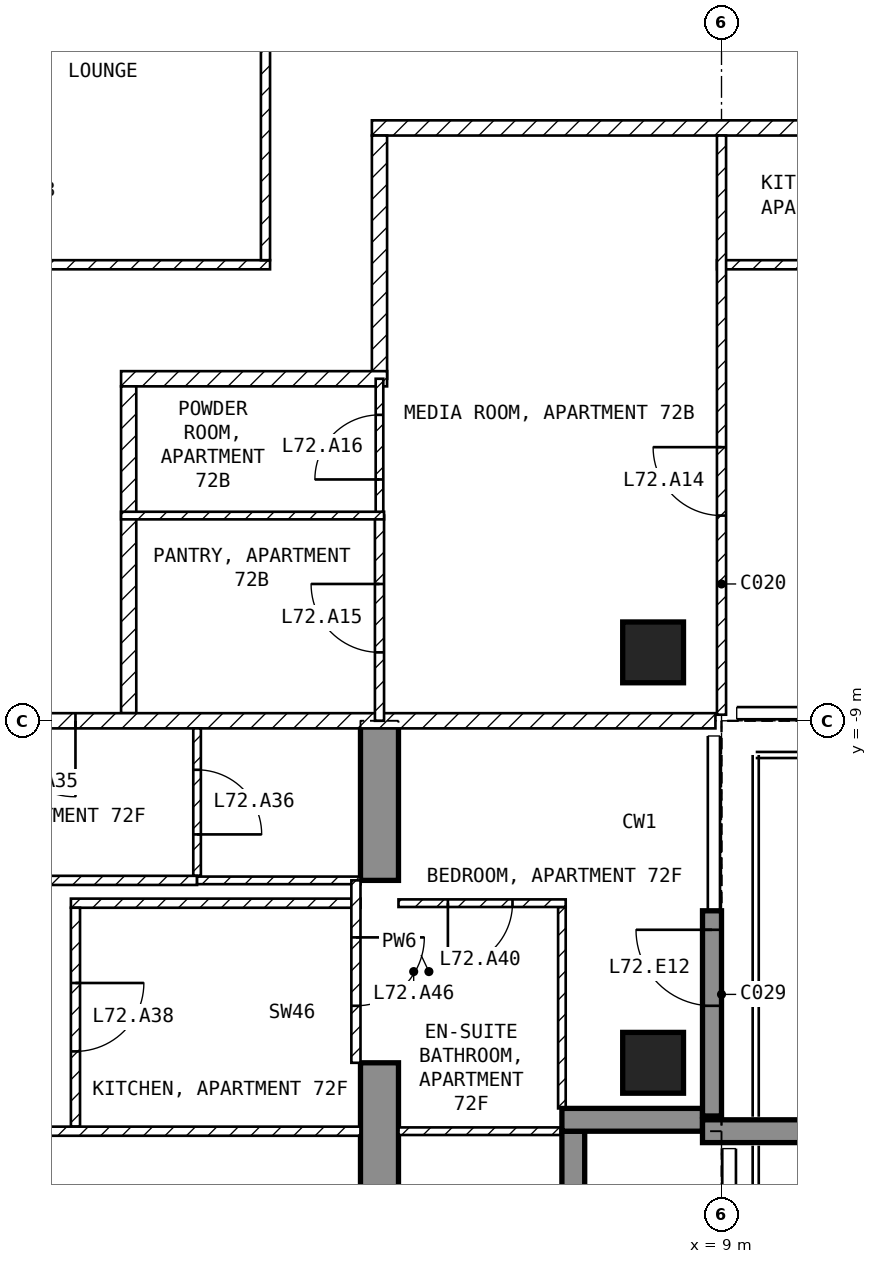
"""IFC4 building model, lengths in metres.
Left out: names, types, materials, properties, quantities, classifications, styles, units other than length and angle.
Written with IfcOpenShell. Run it as: python <this file> out.ifc"""

import sys

from ifc_helpers import new_model, si_unit, direction, frame, frame_2d, origin, origin_2d, place, context, subcontext, project, spatial, polyline, rectangle, outline, extrude, element, fill, save


model = new_model("IFC4")
c1 = context("Model", 3, precision=1e-05, world=origin(), true_north=direction((0.0, 1.0)))
c2 = subcontext(c1, "Body", "Model", "MODEL_VIEW")
j1 = project(units=[si_unit("LENGTHUNIT", "METRE"), si_unit("PLANEANGLEUNIT", "RADIAN")], contexts=[c1])
p1 = place(None, origin())
s1 = spatial("IfcSite", under=j1, at=p1, CompositionType="ELEMENT")
p2 = place(p1, origin())
s2 = spatial("IfcBuilding", under=s1, at=p2, CompositionType="ELEMENT")
p3 = place(p2, frame((0.0, 0.0, 281.5)))
s3 = spatial("IfcBuildingStorey", under=s2, at=p3, CompositionType="ELEMENT", Elevation=281.5)
for number, where, z_axis, x_axis in (
    (1, (8.1, -13.5, -0.25), (0.0, 0.0, 1.0), (1.0, 0.0, 0.0)),
    (2, (8.1, -8.1, -0.25), (0.0, 0.0, 1.0), (1.0, 0.0, 0.0)),
):
    element("IfcColumn", number, at=place(p3, frame(where, z_axis=z_axis, x_axis=x_axis)), inside=s3, PredefinedType="COLUMN", context=c2, shape_type="SweptSolid", body=[
        extrude(rectangle(XDim=0.8, YDim=0.8, at=origin_2d()), origin(), (0.0, 0.0, 1.0), 3.45),
    ])
p4 = place(p3, frame((4.25, -16.7, -0.25), z_axis=(1.0, 0.0, 0.0), x_axis=(0.0, 1.0, 0.0)))
e3 = element("IfcWall", 3, at=p4, inside=s3, PredefinedType="SHEAR", context=c2, shape_type="SweptSolid", body=[
    extrude(outline(polyline([(0.0, 0.0), (3.2, 0.0), (3.2, 2.65), (5.6, 2.65), (5.6, 0.0), (7.7, 0.0), (7.7, 3.45), (0.0, 3.45), (0.0, 0.0)])), origin(), (0.0, 0.0, 1.0), 0.5),
])
p5 = place(p3, frame((8.875, -14.2, 0.0), z_axis=(0.0, 0.0, 1.0), x_axis=(0.0, 1.0, 0.0)))
e4 = element("IfcWall", 4, at=p5, inside=s3, PredefinedType="SOLIDWALL", context=c2, shape_type="SweptSolid", body=[
    extrude(rectangle(XDim=2.7, YDim=0.25, at=frame_2d((1.35, 0.0))), origin(), (0.0, 0.0, 1.0), 3.2),
])
p6 = place(p5, frame((1.45, 0.0, 0.0)))
e5 = element("IfcOpeningElement", 5, at=p6, cuts=e4, PredefinedType="OPENING", context=c2, shape_type="SweptSolid", body=[
    extrude(rectangle(XDim=1.0, YDim=2.4, at=frame_2d((0.5, 1.2))), frame((0.0, 0.135, 0.0), z_axis=(0.0, -1.0, 0.0), x_axis=(1.0, 0.0, 0.0)), (0.0, 0.0, 1.0), 0.27),
])
p7 = place(p3, frame((7.05, -16.2, 0.0), z_axis=(0.0, 0.0, 1.0), x_axis=(0.0, 1.0, 0.0)))
e6 = element("IfcWall", 6, at=p7, inside=s3, PredefinedType="SOLIDWALL", context=c2, shape_type="SweptSolid", body=[
    extrude(rectangle(XDim=1.8, YDim=0.3, at=frame_2d((0.9, 0.0))), origin(), (0.0, 0.0, 1.0), 3.2),
])
p8 = place(p3, frame((6.9, -14.25, 0.0), z_axis=(0.0, 0.0, 1.0), x_axis=(1.0, 0.0, 0.0)))
e7 = element("IfcWall", 7, at=p8, inside=s3, PredefinedType="SOLIDWALL", context=c2, shape_type="SweptSolid", body=[
    extrude(rectangle(XDim=1.85, YDim=0.3, at=frame_2d((0.925, 0.0))), origin(), (0.0, 0.0, 1.0), 3.2),
])
p9 = place(p3, frame((8.75, -14.4, 0.0), z_axis=(0.0, 0.0, 1.0), x_axis=(1.0, 0.0, 0.0)))
e8 = element("IfcWall", 8, at=p9, inside=s3, PredefinedType="SOLIDWALL", context=c2, shape_type="SweptSolid", body=[
    extrude(rectangle(XDim=2.95, YDim=0.3, at=frame_2d((1.475, 0.0))), origin(), (0.0, 0.0, 1.0), 3.2),
])
p10 = place(p3, frame((-3.06, -3.0, 0.0), z_axis=(0.0, 0.0, 1.0), x_axis=(1.0, 0.0, 0.0)))
e9 = element("IfcWall", 9, at=p10, inside=s3, PredefinedType="PARTITIONING", context=c2, shape_type="SweptSolid", body=[
    extrude(rectangle(XDim=6.12, YDim=0.12, at=frame_2d((3.06, 0.0))), origin(), (0.0, 0.0, 1.0), 3.2),
])
p11 = place(p3, frame((3.0, -2.94, 0.0), z_axis=(0.0, 0.0, 1.0), x_axis=(0.0, 1.0, 0.0)))
e10 = element("IfcWall", 10, at=p11, inside=s3, PredefinedType="PARTITIONING", context=c2, shape_type="SweptSolid", body=[
    extrude(rectangle(XDim=5.88, YDim=0.12, at=frame_2d((2.94, 0.0))), origin(), (0.0, 0.0, 1.0), 3.2),
])
p12 = place(p3, frame((21.6, -1.2, 0.0), z_axis=(0.0, 0.0, 1.0), x_axis=(-1.0, 0.0, 0.0)))
e11 = element("IfcWall", 11, at=p12, inside=s3, PredefinedType="PARTITIONING", context=c2, shape_type="SweptSolid", body=[
    extrude(rectangle(XDim=17.2, YDim=0.2, at=frame_2d((8.6, 0.0))), origin(), (0.0, 0.0, 1.0), 3.2),
])
p13 = place(p12, frame((7.9, 0.0, 0.0)))
e12 = element("IfcOpeningElement", 12, at=p13, cuts=e11, PredefinedType="OPENING", context=c2, shape_type="SweptSolid", body=[
    extrude(rectangle(XDim=1.0, YDim=2.1, at=frame_2d((0.5, 1.05))), frame((0.0, 0.11, 0.0), z_axis=(0.0, -1.0, 0.0), x_axis=(1.0, 0.0, 0.0)), (0.0, 0.0, 1.0), 0.22),
])
p14 = place(p3, frame((4.5, -1.3, 0.0), z_axis=(0.0, 0.0, 1.0), x_axis=(0.0, -1.0, 0.0)))
e13 = element("IfcWall", 13, at=p14, inside=s3, PredefinedType="PARTITIONING", context=c2, shape_type="SweptSolid", body=[
    extrude(rectangle(XDim=3.2, YDim=0.2, at=frame_2d((1.6, 0.0))), origin(), (0.0, 0.0, 1.0), 3.2),
])
p15 = place(p3, frame((4.6, -4.5, 0.0), z_axis=(0.0, 0.0, 1.0), x_axis=(-1.0, 0.0, 0.0)))
e14 = element("IfcWall", 14, at=p15, inside=s3, PredefinedType="PARTITIONING", context=c2, shape_type="SweptSolid", body=[
    extrude(rectangle(XDim=3.5, YDim=0.2, at=frame_2d((1.75, 0.0))), origin(), (0.0, 0.0, 1.0), 3.2),
])
p16 = place(p3, frame((1.2, -4.6, 0.0), z_axis=(0.0, 0.0, 1.0), x_axis=(0.0, -1.0, 0.0)))
e15 = element("IfcWall", 15, at=p16, inside=s3, PredefinedType="PARTITIONING", context=c2, shape_type="SweptSolid", body=[
    extrude(rectangle(XDim=4.3, YDim=0.2, at=frame_2d((2.15, 0.0))), origin(), (0.0, 0.0, 1.0), 3.2),
])
p17 = place(p3, frame((8.92, -9.0, 0.0), z_axis=(0.0, 0.0, 1.0), x_axis=(-1.0, 0.0, 0.0)))
e16 = element("IfcWall", 16, at=p17, inside=s3, PredefinedType="PARTITIONING", context=c2, shape_type="SweptSolid", body=[
    extrude(rectangle(XDim=17.84, YDim=0.2, at=frame_2d((8.92, 0.0))), origin(), (0.0, 0.0, 1.0), 3.2),
])
p18 = place(p17, frame((8.42, 0.0, 0.0)))
e17 = element("IfcOpeningElement", 17, at=p18, cuts=e16, PredefinedType="OPENING", context=c2, shape_type="SweptSolid", body=[
    extrude(rectangle(XDim=1.0, YDim=2.1, at=frame_2d((0.5, 1.05))), frame((0.0, 0.11, 0.0), z_axis=(0.0, -1.0, 0.0), x_axis=(1.0, 0.0, 0.0)), (0.0, 0.0, 1.0), 0.22),
])
p19 = place(p3, frame((16.8, -3.0, 0.0), z_axis=(0.0, 0.0, 1.0), x_axis=(-1.0, 0.0, 0.0)))
e18 = element("IfcWall", 18, at=p19, inside=s3, PredefinedType="PARTITIONING", context=c2, shape_type="SweptSolid", body=[
    extrude(rectangle(XDim=7.86, YDim=0.12, at=frame_2d((3.93, 0.0))), origin(), (0.0, 0.0, 1.0), 3.2),
])
p20 = place(p19, frame((3.15, 0.0, 0.0)))
e19 = element("IfcOpeningElement", 19, at=p20, cuts=e18, PredefinedType="OPENING", context=c2, shape_type="SweptSolid", body=[
    extrude(rectangle(XDim=0.9, YDim=2.1, at=frame_2d((0.45, 1.05))), frame((0.0, 0.07, 0.0), z_axis=(0.0, -1.0, 0.0), x_axis=(1.0, 0.0, 0.0)), (0.0, 0.0, 1.0), 0.14),
])
p21 = place(p3, frame((9.0, -8.92, 0.0), z_axis=(0.0, 0.0, 1.0), x_axis=(0.0, 1.0, 0.0)))
e20 = element("IfcWall", 20, at=p21, inside=s3, PredefinedType="PARTITIONING", context=c2, shape_type="SweptSolid", body=[
    extrude(rectangle(XDim=7.62, YDim=0.12, at=frame_2d((3.81, 0.0))), origin(), (0.0, 0.0, 1.0), 3.2),
])
p22 = place(p21, frame((2.62, 0.0, 0.0)))
e21 = element("IfcOpeningElement", 21, at=p22, cuts=e20, PredefinedType="OPENING", context=c2, shape_type="SweptSolid", body=[
    extrude(rectangle(XDim=0.9, YDim=2.1, at=frame_2d((0.45, 1.05))), frame((0.0, 0.07, 0.0), z_axis=(0.0, -1.0, 0.0), x_axis=(1.0, 0.0, 0.0)), (0.0, 0.0, 1.0), 0.14),
])
p23 = place(p3, frame((4.5, -6.3, 0.0), z_axis=(0.0, 0.0, 1.0), x_axis=(0.0, 1.0, 0.0)))
e22 = element("IfcWall", 22, at=p23, inside=s3, PredefinedType="PARTITIONING", context=c2, shape_type="SweptSolid", body=[
    extrude(rectangle(XDim=1.8, YDim=0.1, at=frame_2d((0.9, 0.0))), origin(), (0.0, 0.0, 1.0), 3.2),
])
p24 = place(p23, frame((0.475, 0.0, 0.0)))
e23 = element("IfcOpeningElement", 23, at=p24, cuts=e22, PredefinedType="OPENING", context=c2, shape_type="SweptSolid", body=[
    extrude(rectangle(XDim=0.85, YDim=2.1, at=frame_2d((0.425, 1.05))), frame((0.0, 0.06, 0.0), z_axis=(0.0, -1.0, 0.0), x_axis=(1.0, 0.0, 0.0)), (0.0, 0.0, 1.0), 0.12),
])
p25 = place(p3, frame((4.5, -9.0, 0.0), z_axis=(0.0, 0.0, 1.0), x_axis=(0.0, 1.0, 0.0)))
e24 = element("IfcWall", 24, at=p25, inside=s3, PredefinedType="PARTITIONING", context=c2, shape_type="SweptSolid", body=[
    extrude(rectangle(XDim=2.7, YDim=0.12, at=frame_2d((1.35, 0.0))), origin(), (0.0, 0.0, 1.0), 3.2),
])
p26 = place(p25, frame((0.9, 0.0, 0.0)))
e25 = element("IfcOpeningElement", 25, at=p26, cuts=e24, PredefinedType="OPENING", context=c2, shape_type="SweptSolid", body=[
    extrude(rectangle(XDim=0.9, YDim=2.1, at=frame_2d((0.45, 1.05))), frame((0.0, 0.07, 0.0), z_axis=(0.0, -1.0, 0.0), x_axis=(1.0, 0.0, 0.0)), (0.0, 0.0, 1.0), 0.14),
])
p27 = place(p3, frame((4.56, -6.3, 0.0), z_axis=(0.0, 0.0, 1.0), x_axis=(-1.0, 0.0, 0.0)))
e26 = element("IfcWall", 26, at=p27, inside=s3, PredefinedType="PARTITIONING", context=c2, shape_type="SweptSolid", body=[
    extrude(rectangle(XDim=3.46, YDim=0.1, at=frame_2d((1.73, 0.0))), origin(), (0.0, 0.0, 1.0), 3.2),
])
p28 = place(p3, frame((2.1, -9.1, 0.0), z_axis=(0.0, 0.0, 1.0), x_axis=(0.0, -1.0, 0.0)))
e27 = element("IfcWall", 27, at=p28, inside=s3, PredefinedType="PARTITIONING", context=c2, shape_type="SweptSolid", body=[
    extrude(rectangle(XDim=1.94, YDim=0.1, at=frame_2d((0.97, 0.0))), origin(), (0.0, 0.0, 1.0), 3.2),
])
p29 = place(p28, frame((0.545, 0.0, 0.0)))
e28 = element("IfcOpeningElement", 28, at=p29, cuts=e27, PredefinedType="OPENING", context=c2, shape_type="SweptSolid", body=[
    extrude(rectangle(XDim=0.85, YDim=2.1, at=frame_2d((0.425, 1.05))), frame((0.0, 0.06, 0.0), z_axis=(0.0, -1.0, 0.0), x_axis=(1.0, 0.0, 0.0)), (0.0, 0.0, 1.0), 0.12),
])
p30 = place(p3, frame((2.1, -11.1, 0.0), z_axis=(0.0, 0.0, 1.0), x_axis=(-1.0, 0.0, 0.0)))
e29 = element("IfcWall", 29, at=p30, inside=s3, PredefinedType="PARTITIONING", context=c2, shape_type="SweptSolid", body=[
    extrude(rectangle(XDim=6.35, YDim=0.12, at=frame_2d((3.175, 0.0))), origin(), (0.0, 0.0, 1.0), 3.2),
])
p31 = place(p30, frame((2.725, 0.0, 0.0)))
e30 = element("IfcOpeningElement", 30, at=p31, cuts=e29, PredefinedType="OPENING", context=c2, shape_type="SweptSolid", body=[
    extrude(rectangle(XDim=0.9, YDim=2.1, at=frame_2d((0.45, 1.05))), frame((0.0, 0.07, 0.0), z_axis=(0.0, -1.0, 0.0), x_axis=(1.0, 0.0, 0.0)), (0.0, 0.0, 1.0), 0.14),
])
p32 = place(p3, frame((4.25, -11.1, 0.0), z_axis=(0.0, 0.0, 1.0), x_axis=(-1.0, 0.0, 0.0)))
e31 = element("IfcWall", 31, at=p32, inside=s3, PredefinedType="PARTITIONING", context=c2, shape_type="SweptSolid", body=[
    extrude(rectangle(XDim=2.15, YDim=0.1, at=frame_2d((1.075, 0.0))), origin(), (0.0, 0.0, 1.0), 3.2),
])
p33 = place(p3, frame((4.25, -11.4, 0.0), z_axis=(0.0, 0.0, 1.0), x_axis=(-1.0, 0.0, 0.0)))
e32 = element("IfcWall", 32, at=p33, inside=s3, PredefinedType="PARTITIONING", context=c2, shape_type="SweptSolid", body=[
    extrude(rectangle(XDim=3.81, YDim=0.12, at=frame_2d((1.905, 0.0))), origin(), (0.0, 0.0, 1.0), 3.2),
])
p34 = place(p3, frame((0.5, -11.46, 0.0), z_axis=(0.0, 0.0, 1.0), x_axis=(0.0, -1.0, 0.0)))
e33 = element("IfcWall", 33, at=p34, inside=s3, PredefinedType="PARTITIONING", context=c2, shape_type="SweptSolid", body=[
    extrude(rectangle(XDim=2.88, YDim=0.12, at=frame_2d((1.44, 0.0))), origin(), (0.0, 0.0, 1.0), 3.2),
])
p35 = place(p34, frame((0.99, 0.0, 0.0)))
e34 = element("IfcOpeningElement", 34, at=p35, cuts=e33, PredefinedType="OPENING", context=c2, shape_type="SweptSolid", body=[
    extrude(rectangle(XDim=0.9, YDim=2.1, at=frame_2d((0.45, 1.05))), frame((0.0, 0.07, 0.0), z_axis=(0.0, -1.0, 0.0), x_axis=(1.0, 0.0, 0.0)), (0.0, 0.0, 1.0), 0.14),
])
p36 = place(p3, frame((4.25, -14.4, 0.0), z_axis=(0.0, 0.0, 1.0), x_axis=(-1.0, 0.0, 0.0)))
e35 = element("IfcWall", 35, at=p36, inside=s3, PredefinedType="PARTITIONING", context=c2, shape_type="SweptSolid", body=[
    extrude(rectangle(XDim=8.5, YDim=0.12, at=frame_2d((4.25, 0.0))), origin(), (0.0, 0.0, 1.0), 3.2),
])
p37 = place(p36, frame((5.675, 0.0, 0.0)))
e36 = element("IfcOpeningElement", 36, at=p37, cuts=e35, PredefinedType="OPENING", context=c2, shape_type="SweptSolid", body=[
    extrude(rectangle(XDim=0.9, YDim=2.1, at=frame_2d((0.45, 1.05))), frame((0.0, 0.07, 0.0), z_axis=(0.0, -1.0, 0.0), x_axis=(1.0, 0.0, 0.0)), (0.0, 0.0, 1.0), 0.14),
])
p38 = place(p3, frame((6.9, -14.1, 0.0), z_axis=(0.0, 0.0, 1.0), x_axis=(0.0, 1.0, 0.0)))
e37 = element("IfcWall", 37, at=p38, inside=s3, PredefinedType="PARTITIONING", context=c2, shape_type="SweptSolid", body=[
    extrude(rectangle(XDim=2.65, YDim=0.1, at=frame_2d((1.325, 0.0))), origin(), (0.0, 0.0, 1.0), 3.2),
])
p39 = place(p3, frame((6.95, -11.4, 0.0), z_axis=(0.0, 0.0, 1.0), x_axis=(-1.0, 0.0, 0.0)))
e38 = element("IfcWall", 38, at=p39, inside=s3, PredefinedType="PARTITIONING", context=c2, shape_type="SweptSolid", body=[
    extrude(rectangle(XDim=2.2, YDim=0.1, at=frame_2d((1.1, 0.0))), origin(), (0.0, 0.0, 1.0), 3.2),
])
p40 = place(p39, frame((0.7, 0.0, 0.0)))
e39 = element("IfcOpeningElement", 39, at=p40, cuts=e38, PredefinedType="OPENING", context=c2, shape_type="SweptSolid", body=[
    extrude(rectangle(XDim=0.85, YDim=2.1, at=frame_2d((0.425, 1.05))), frame((0.0, 0.06, 0.0), z_axis=(0.0, -1.0, 0.0), x_axis=(1.0, 0.0, 0.0)), (0.0, 0.0, 1.0), 0.12),
])
p41 = place(p3, frame((7.12, -14.4, 0.0), z_axis=(0.0, 0.0, 1.0), x_axis=(-1.0, 0.0, 0.0)))
e40 = element("IfcWall", 40, at=p41, inside=s3, PredefinedType="PARTITIONING", context=c2, shape_type="SweptSolid", body=[
    extrude(rectangle(XDim=2.37, YDim=0.1, at=frame_2d((1.185, 0.0))), origin(), (0.0, 0.0, 1.0), 3.2),
])
p42 = place(p3, frame((4.19, -11.1, 0.0), z_axis=(0.0, 0.0, 1.0), x_axis=(0.0, -1.0, 0.0)))
e41 = element("IfcWall", 41, at=p42, inside=s3, PredefinedType="PARTITIONING", context=c2, shape_type="SweptSolid", body=[
    extrude(rectangle(XDim=2.4, YDim=0.12, at=frame_2d((1.2, 0.0))), origin(), (0.0, 0.0, 1.0), 2.4),
])
p43 = place(p42, frame((0.75, 0.0, 0.0)))
e42 = element("IfcOpeningElement", 42, at=p43, cuts=e41, PredefinedType="OPENING", context=c2, shape_type="SweptSolid", body=[
    extrude(rectangle(XDim=0.9, YDim=2.1, at=frame_2d((0.45, 1.05))), frame((0.0, 0.07, 0.0), z_axis=(0.0, -1.0, 0.0), x_axis=(1.0, 0.0, 0.0)), (0.0, 0.0, 1.0), 0.14),
])
p44 = place(p6, origin())
e43 = element("IfcDoor", 43, at=p44, inside=s3, OperationType="SINGLE_SWING_RIGHT", PredefinedType="DOOR", context=c2, shape_type="SweptSolid", body=[
    extrude(rectangle(XDim=1.0, YDim=2.4, at=frame_2d((0.5, 1.2))), frame((0.0, 0.025, 0.0), z_axis=(0.0, -1.0, 0.0), x_axis=(1.0, 0.0, 0.0)), (0.0, 0.0, 1.0), 0.05),
])
fill(e5, e43)
p45 = place(p22, origin())
e44 = element("IfcDoor", 44, at=p45, inside=s3, OperationType="SINGLE_SWING_RIGHT", PredefinedType="DOOR", context=c2, shape_type="SweptSolid", body=[
    extrude(rectangle(XDim=0.9, YDim=2.1, at=frame_2d((0.45, 1.05))), frame((0.0, 0.025, 0.0), z_axis=(0.0, -1.0, 0.0), x_axis=(1.0, 0.0, 0.0)), (0.0, 0.0, 1.0), 0.05),
])
fill(e21, e44)
p46 = place(p26, origin())
e45 = element("IfcDoor", 45, at=p46, inside=s3, OperationType="SINGLE_SWING_RIGHT", PredefinedType="DOOR", context=c2, shape_type="SweptSolid", body=[
    extrude(rectangle(XDim=0.9, YDim=2.1, at=frame_2d((0.45, 1.05))), frame((0.0, 0.025, 0.0), z_axis=(0.0, -1.0, 0.0), x_axis=(1.0, 0.0, 0.0)), (0.0, 0.0, 1.0), 0.05),
])
fill(e25, e45)
p47 = place(p24, origin())
e46 = element("IfcDoor", 46, at=p47, inside=s3, OperationType="SINGLE_SWING_LEFT", PredefinedType="DOOR", context=c2, shape_type="SweptSolid", body=[
    extrude(rectangle(XDim=0.85, YDim=2.1, at=frame_2d((0.425, 1.05))), frame((0.0, 0.025, 0.0), z_axis=(0.0, -1.0, 0.0), x_axis=(1.0, 0.0, 0.0)), (0.0, 0.0, 1.0), 0.05),
])
fill(e23, e46)
p48 = place(p18, origin())
e47 = element("IfcDoor", 47, at=p48, inside=s3, OperationType="SINGLE_SWING_LEFT", PredefinedType="DOOR", context=c2, shape_type="SweptSolid", body=[
    extrude(rectangle(XDim=1.0, YDim=2.1, at=frame_2d((0.5, 1.05))), frame((0.0, 0.025, 0.0), z_axis=(0.0, -1.0, 0.0), x_axis=(1.0, 0.0, 0.0)), (0.0, 0.0, 1.0), 0.05),
])
fill(e17, e47)
p49 = place(p29, origin())
e48 = element("IfcDoor", 48, at=p49, inside=s3, OperationType="SINGLE_SWING_RIGHT", PredefinedType="DOOR", context=c2, shape_type="SweptSolid", body=[
    extrude(rectangle(XDim=0.85, YDim=2.1, at=frame_2d((0.425, 1.05))), frame((0.0, 0.025, 0.0), z_axis=(0.0, -1.0, 0.0), x_axis=(1.0, 0.0, 0.0)), (0.0, 0.0, 1.0), 0.05),
])
fill(e28, e48)
p50 = place(p35, origin())
e49 = element("IfcDoor", 49, at=p50, inside=s3, OperationType="SINGLE_SWING_LEFT", PredefinedType="DOOR", context=c2, shape_type="SweptSolid", body=[
    extrude(rectangle(XDim=0.9, YDim=2.1, at=frame_2d((0.45, 1.05))), frame((0.0, 0.025, 0.0), z_axis=(0.0, -1.0, 0.0), x_axis=(1.0, 0.0, 0.0)), (0.0, 0.0, 1.0), 0.05),
])
fill(e34, e49)
p51 = place(p40, origin())
e50 = element("IfcDoor", 50, at=p51, inside=s3, OperationType="SINGLE_SWING_RIGHT", PredefinedType="DOOR", context=c2, shape_type="SweptSolid", body=[
    extrude(rectangle(XDim=0.85, YDim=2.1, at=frame_2d((0.425, 1.05))), frame((0.0, 0.025, 0.0), z_axis=(0.0, -1.0, 0.0), x_axis=(1.0, 0.0, 0.0)), (0.0, 0.0, 1.0), 0.05),
])
fill(e39, e50)
p52 = place(p43, origin())
e51 = element("IfcDoor", 51, at=p52, inside=s3, OperationType="SINGLE_SWING_LEFT", PredefinedType="DOOR", context=c2, shape_type="SweptSolid", body=[
    extrude(rectangle(XDim=0.9, YDim=2.1, at=frame_2d((0.45, 1.05))), frame((0.0, 0.025, 0.0), z_axis=(0.0, -1.0, 0.0), x_axis=(1.0, 0.0, 0.0)), (0.0, 0.0, 1.0), 0.05),
])
fill(e42, e51)
save(model, sys.argv[1])
